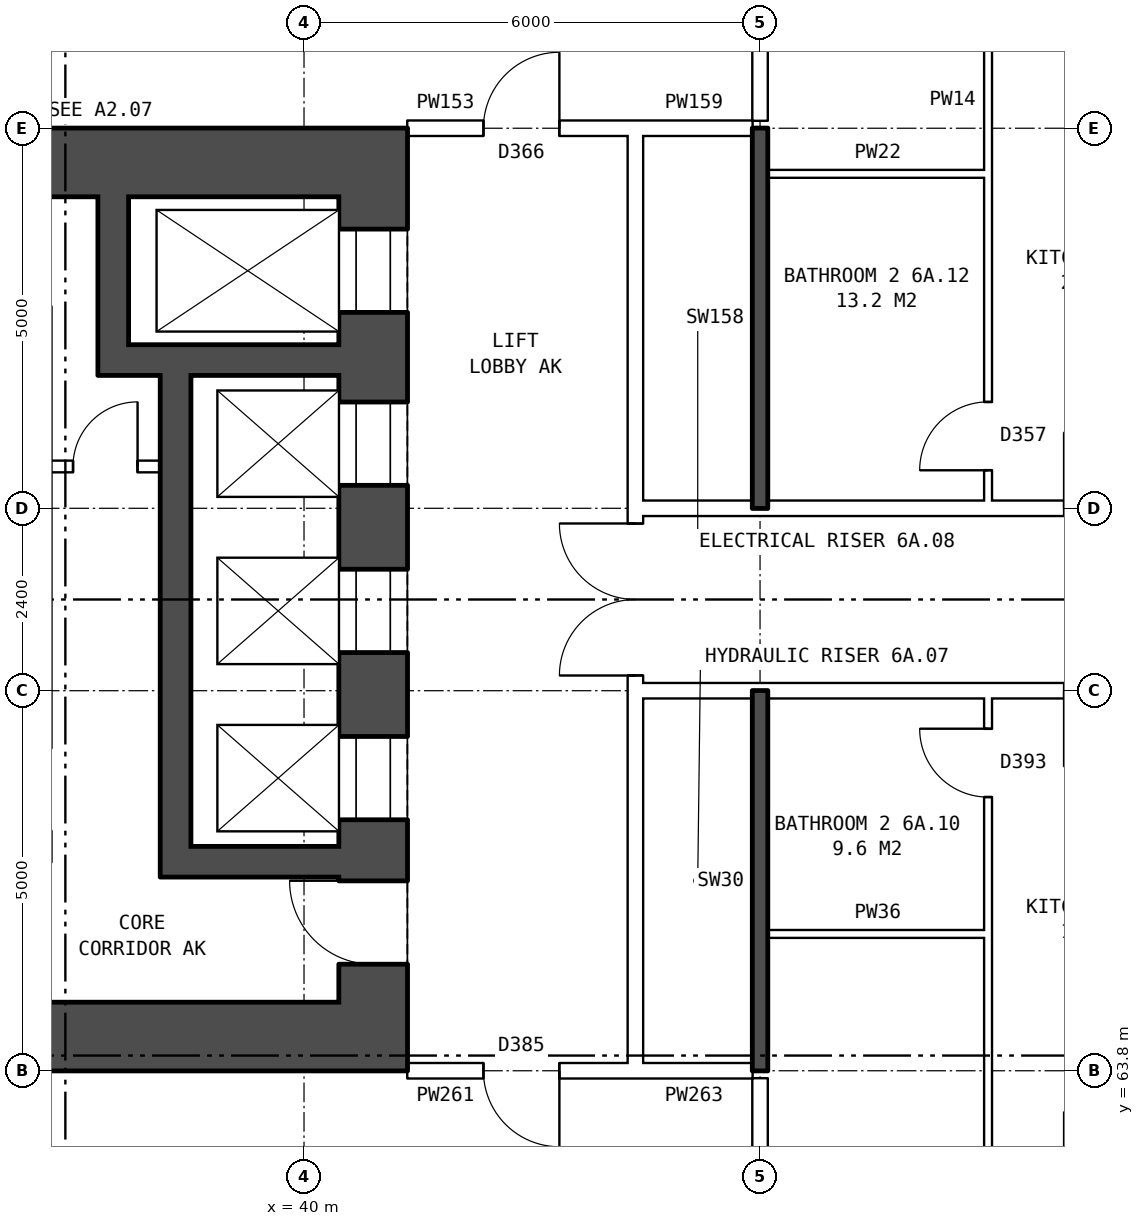
"""IFC4 building model, lengths in metres.
Left out: names, types, materials, properties, quantities, classifications, styles, units other than length and angle.
Written with IfcOpenShell. Run it as: python <this file> out.ifc"""

import sys

from ifc_helpers import new_model, si_unit, direction, frame, frame_2d, origin, place, context, subcontext, project, spatial, rectangle, extrude, element, fill, save


model = new_model("IFC4")
c1 = context("Model", 3, precision=1e-05, world=origin(), true_north=direction((0.0, 1.0)))
c2 = subcontext(c1, "Body", "Model", "MODEL_VIEW")
j1 = project(units=[si_unit("LENGTHUNIT", "METRE"), si_unit("PLANEANGLEUNIT", "RADIAN")], contexts=[c1])
p1 = place(None, origin())
s1 = spatial("IfcSite", under=j1, at=p1, CompositionType="ELEMENT")
p2 = place(p1, origin())
s2 = spatial("IfcBuilding", under=s1, at=p2, CompositionType="ELEMENT")
p3 = place(p2, frame((0.0, 0.0, 25.7)))
s3 = spatial("IfcBuildingStorey", under=s2, at=p3, CompositionType="ELEMENT", Elevation=25.7)
p4 = place(p3, frame((40.91, 75.3, 0.0), z_axis=(0.0, 0.0, 1.0), x_axis=(0.0, -1.0, 0.0)))
e1 = element("IfcWall", 1, at=p4, inside=s3, PredefinedType="SHEAR", context=c2, shape_type="SweptSolid", body=[
    extrude(rectangle(XDim=10.6, YDim=0.9, at=frame_2d((5.3, 0.0))), origin(), (0.0, 0.0, 1.0), 2.85),
])
p5 = place(p4, frame((0.425, 0.0, 0.0)))
e2 = element("IfcOpeningElement", 2, at=p5, cuts=e1, PredefinedType="OPENING", context=c2, shape_type="SweptSolid", body=[
    extrude(rectangle(XDim=1.1, YDim=2.1, at=frame_2d((0.55, 1.05))), frame((0.0, 0.46, 0.0), z_axis=(0.0, -1.0, 0.0), x_axis=(1.0, 0.0, 0.0)), (0.0, 0.0, 1.0), 0.92),
])
p6 = place(p4, frame((2.7, 0.0, 0.0)))
e3 = element("IfcOpeningElement", 3, at=p6, cuts=e1, PredefinedType="OPENING", context=c2, shape_type="SweptSolid", body=[
    extrude(rectangle(XDim=1.1, YDim=2.1, at=frame_2d((0.55, 1.05))), frame((0.0, 0.46, 0.0), z_axis=(0.0, -1.0, 0.0), x_axis=(1.0, 0.0, 0.0)), (0.0, 0.0, 1.0), 0.92),
])
p7 = place(p4, frame((4.9, 0.0, 0.0)))
e4 = element("IfcOpeningElement", 4, at=p7, cuts=e1, PredefinedType="OPENING", context=c2, shape_type="SweptSolid", body=[
    extrude(rectangle(XDim=1.1, YDim=2.1, at=frame_2d((0.55, 1.05))), frame((0.0, 0.46, 0.0), z_axis=(0.0, -1.0, 0.0), x_axis=(1.0, 0.0, 0.0)), (0.0, 0.0, 1.0), 0.92),
])
p8 = place(p4, frame((7.1, 0.0, 0.0)))
e5 = element("IfcOpeningElement", 5, at=p8, cuts=e1, PredefinedType="OPENING", context=c2, shape_type="SweptSolid", body=[
    extrude(rectangle(XDim=1.1, YDim=2.1, at=frame_2d((0.55, 1.05))), frame((0.0, 0.46, 0.0), z_axis=(0.0, -1.0, 0.0), x_axis=(1.0, 0.0, 0.0)), (0.0, 0.0, 1.0), 0.92),
])
p9 = place(p4, frame((9.0, 0.0, 0.0)))
e6 = element("IfcOpeningElement", 6, at=p9, cuts=e1, PredefinedType="OPENING", context=c2, shape_type="SweptSolid", body=[
    extrude(rectangle(XDim=1.1, YDim=2.1, at=frame_2d((0.55, 1.05))), frame((0.0, 0.46, 0.0), z_axis=(0.0, -1.0, 0.0), x_axis=(1.0, 0.0, 0.0)), (0.0, 0.0, 1.0), 0.92),
])
for number, where, z_axis, x_axis in (
    (7, (41.36, 75.75, 0.0), (0.0, 0.0, 1.0), (-1.0, 0.0, 0.0)),
    (8, (41.36, 64.25, 0.0), (0.0, 0.0, 1.0), (-1.0, 0.0, 0.0)),
):
    element("IfcWall", number, at=place(p3, frame(where, z_axis=z_axis, x_axis=x_axis)), inside=s3, PredefinedType="SHEAR", context=c2, shape_type="SweptSolid", body=[
        extrude(rectangle(XDim=9.0, YDim=0.9, at=frame_2d((4.5, 0.0))), origin(), (0.0, 0.0, 1.0), 2.85),
    ])
p10 = place(p3, frame((40.46, 73.15, 0.0), z_axis=(0.0, 0.0, 1.0), x_axis=(-1.0, 0.0, 0.0)))
e9 = element("IfcWall", 9, at=p10, inside=s3, PredefinedType="SHEAR", context=c2, shape_type="SweptSolid", body=[
    extrude(rectangle(XDim=3.17, YDim=0.4, at=frame_2d((1.585, 0.0))), origin(), (0.0, 0.0, 1.0), 2.85),
])
p11 = place(p3, frame((38.11, 71.75, 0.0), z_axis=(0.0, 0.0, 1.0), x_axis=(-1.0, 0.0, 0.0)))
e10 = element("IfcWall", 10, at=p11, inside=s3, PredefinedType="PARTITIONING", context=c2, shape_type="SweptSolid", body=[
    extrude(rectangle(XDim=1.45, YDim=0.15, at=frame_2d((0.725, 0.0))), origin(), (0.0, 0.0, 1.0), 2.85),
])
p12 = place(p11, frame((0.3, 0.0, 0.0)))
e11 = element("IfcOpeningElement", 11, at=p12, cuts=e10, PredefinedType="OPENING", context=c2, shape_type="SweptSolid", body=[
    extrude(rectangle(XDim=0.85, YDim=2.1, at=frame_2d((0.425, 1.05))), frame((0.0, 0.085, 0.0), z_axis=(0.0, -1.0, 0.0), x_axis=(1.0, 0.0, 0.0)), (0.0, 0.0, 1.0), 0.17),
])
p13 = place(p3, frame((40.46, 66.55, 0.0), z_axis=(0.0, 0.0, 1.0), x_axis=(-1.0, 0.0, 0.0)))
e12 = element("IfcWall", 12, at=p13, inside=s3, PredefinedType="SHEAR", context=c2, shape_type="SweptSolid", body=[
    extrude(rectangle(XDim=1.95, YDim=0.4, at=frame_2d((0.975, 0.0))), origin(), (0.0, 0.0, 1.0), 2.85),
])
p14 = place(p3, frame((38.31, 72.95, 0.0), z_axis=(0.0, 0.0, 1.0), x_axis=(0.0, -1.0, 0.0)))
e13 = element("IfcWall", 13, at=p14, inside=s3, PredefinedType="SHEAR", context=c2, shape_type="SweptSolid", body=[
    extrude(rectangle(XDim=6.6, YDim=0.4, at=frame_2d((3.3, 0.0))), origin(), (0.0, 0.0, 1.0), 2.85),
])
p15 = place(p3, frame((37.49, 75.3, 0.0), z_axis=(0.0, 0.0, 1.0), x_axis=(0.0, -1.0, 0.0)))
e14 = element("IfcWall", 14, at=p15, inside=s3, PredefinedType="SHEAR", context=c2, shape_type="SweptSolid", body=[
    extrude(rectangle(XDim=1.95, YDim=0.4, at=frame_2d((0.975, 0.0))), origin(), (0.0, 0.0, 1.0), 2.85),
])
p16 = place(p3, frame((44.36, 63.9, 0.0), z_axis=(0.0, 0.0, 1.0), x_axis=(0.0, 1.0, 0.0)))
e15 = element("IfcWall", 15, at=p16, inside=s3, PredefinedType="PARTITIONING", context=c2, shape_type="SweptSolid", body=[
    extrude(rectangle(XDim=12.2, YDim=0.2, at=frame_2d((6.1, 0.0))), origin(), (0.0, 0.0, 1.0), 2.85),
])
p17 = place(p16, frame((5.1, 0.0, 0.0)))
e16 = element("IfcOpeningElement", 16, at=p17, cuts=e15, PredefinedType="OPENING", context=c2, shape_type="SweptSolid", body=[
    extrude(rectangle(XDim=2.0, YDim=2.1, at=frame_2d((1.0, 1.05))), frame((0.0, 0.11, 0.0), z_axis=(0.0, -1.0, 0.0), x_axis=(1.0, 0.0, 0.0)), (0.0, 0.0, 1.0), 0.22),
])
p18 = place(p3, frame((41.36, 63.8, 0.0), z_axis=(0.0, 0.0, 1.0), x_axis=(1.0, 0.0, 0.0)))
e17 = element("IfcWall", 17, at=p18, inside=s3, PredefinedType="PARTITIONING", context=c2, shape_type="SweptSolid", body=[
    extrude(rectangle(XDim=3.0, YDim=0.2, at=frame_2d((1.5, 0.0))), origin(), (0.0, 0.0, 1.0), 2.85),
])
p19 = place(p18, frame((1.0, 0.0, 0.0)))
e18 = element("IfcOpeningElement", 18, at=p19, cuts=e17, PredefinedType="OPENING", context=c2, shape_type="SweptSolid", body=[
    extrude(rectangle(XDim=1.0, YDim=2.1, at=frame_2d((0.5, 1.05))), frame((0.0, 0.11, 0.0), z_axis=(0.0, -1.0, 0.0), x_axis=(1.0, 0.0, 0.0)), (0.0, 0.0, 1.0), 0.22),
])
p20 = place(p3, frame((44.36, 63.8, 0.0), z_axis=(0.0, 0.0, 1.0), x_axis=(1.0, 0.0, 0.0)))
e19 = element("IfcWall", 19, at=p20, inside=s3, PredefinedType="PARTITIONING", context=c2, shape_type="SweptSolid", body=[
    extrude(rectangle(XDim=1.54, YDim=0.2, at=frame_2d((0.77, 0.0))), origin(), (0.0, 0.0, 1.0), 2.85),
])
p21 = place(p3, frame((46.1, 65.6, 0.0), z_axis=(0.0, 0.0, 1.0), x_axis=(1.0, 0.0, 0.0)))
e20 = element("IfcWall", 20, at=p21, inside=s3, PredefinedType="PARTITIONING", context=c2, shape_type="SweptSolid", body=[
    extrude(rectangle(XDim=2.9, YDim=0.1, at=frame_2d((1.45, 0.0))), origin(), (0.0, 0.0, 1.0), 2.85),
])
p22 = place(p3, frame((44.36, 68.8, 0.0), z_axis=(0.0, 0.0, 1.0), x_axis=(1.0, 0.0, 0.0)))
e21 = element("IfcWall", 21, at=p22, inside=s3, PredefinedType="PARTITIONING", context=c2, shape_type="SweptSolid", body=[
    extrude(rectangle(XDim=19.28, YDim=0.2, at=frame_2d((9.64, 0.0))), origin(), (0.0, 0.0, 1.0), 2.85),
])
p23 = place(p22, frame((14.64, 0.0, 0.0)))
e22 = element("IfcOpeningElement", 22, at=p23, cuts=e21, PredefinedType="OPENING", context=c2, shape_type="SweptSolid", body=[
    extrude(rectangle(XDim=1.0, YDim=2.1, at=frame_2d((0.5, 1.05))), frame((0.0, 0.11, 0.0), z_axis=(0.0, -1.0, 0.0), x_axis=(1.0, 0.0, 0.0)), (0.0, 0.0, 1.0), 0.22),
])
p24 = place(p22, frame((5.64, 0.0, 0.0)))
e23 = element("IfcOpeningElement", 23, at=p24, cuts=e21, PredefinedType="OPENING", context=c2, shape_type="SweptSolid", body=[
    extrude(rectangle(XDim=1.0, YDim=2.1, at=frame_2d((0.5, 1.05))), frame((0.0, 0.11, 0.0), z_axis=(0.0, -1.0, 0.0), x_axis=(1.0, 0.0, 0.0)), (0.0, 0.0, 1.0), 0.22),
])
p25 = place(p3, frame((44.36, 71.2, 0.0), z_axis=(0.0, 0.0, 1.0), x_axis=(1.0, 0.0, 0.0)))
e24 = element("IfcWall", 24, at=p25, inside=s3, PredefinedType="PARTITIONING", context=c2, shape_type="SweptSolid", body=[
    extrude(rectangle(XDim=19.28, YDim=0.2, at=frame_2d((9.64, 0.0))), origin(), (0.0, 0.0, 1.0), 2.85),
])
p26 = place(p25, frame((14.64, 0.0, 0.0)))
e25 = element("IfcOpeningElement", 25, at=p26, cuts=e24, PredefinedType="OPENING", context=c2, shape_type="SweptSolid", body=[
    extrude(rectangle(XDim=1.0, YDim=2.1, at=frame_2d((0.5, 1.05))), frame((0.0, 0.11, 0.0), z_axis=(0.0, -1.0, 0.0), x_axis=(1.0, 0.0, 0.0)), (0.0, 0.0, 1.0), 0.22),
])
p27 = place(p25, frame((5.64, 0.0, 0.0)))
e26 = element("IfcOpeningElement", 26, at=p27, cuts=e24, PredefinedType="OPENING", context=c2, shape_type="SweptSolid", body=[
    extrude(rectangle(XDim=1.0, YDim=2.1, at=frame_2d((0.5, 1.05))), frame((0.0, 0.11, 0.0), z_axis=(0.0, -1.0, 0.0), x_axis=(1.0, 0.0, 0.0)), (0.0, 0.0, 1.0), 0.22),
])
p28 = place(p3, frame((46.1, 75.6, 0.0), z_axis=(0.0, 0.0, 1.0), x_axis=(1.0, 0.0, 0.0)))
e27 = element("IfcWall", 27, at=p28, inside=s3, PredefinedType="PARTITIONING", context=c2, shape_type="SweptSolid", body=[
    extrude(rectangle(XDim=2.9, YDim=0.1, at=frame_2d((1.45, 0.0))), origin(), (0.0, 0.0, 1.0), 2.85),
])
p29 = place(p3, frame((41.36, 76.2, 0.0), z_axis=(0.0, 0.0, 1.0), x_axis=(1.0, 0.0, 0.0)))
e28 = element("IfcWall", 28, at=p29, inside=s3, PredefinedType="PARTITIONING", context=c2, shape_type="SweptSolid", body=[
    extrude(rectangle(XDim=3.0, YDim=0.2, at=frame_2d((1.5, 0.0))), origin(), (0.0, 0.0, 1.0), 2.85),
])
p30 = place(p29, frame((1.0, 0.0, 0.0)))
e29 = element("IfcOpeningElement", 29, at=p30, cuts=e28, PredefinedType="OPENING", context=c2, shape_type="SweptSolid", body=[
    extrude(rectangle(XDim=1.0, YDim=2.1, at=frame_2d((0.5, 1.05))), frame((0.0, 0.11, 0.0), z_axis=(0.0, -1.0, 0.0), x_axis=(1.0, 0.0, 0.0)), (0.0, 0.0, 1.0), 0.22),
])
p31 = place(p3, frame((44.36, 76.2, 0.0), z_axis=(0.0, 0.0, 1.0), x_axis=(1.0, 0.0, 0.0)))
e30 = element("IfcWall", 30, at=p31, inside=s3, PredefinedType="PARTITIONING", context=c2, shape_type="SweptSolid", body=[
    extrude(rectangle(XDim=1.54, YDim=0.2, at=frame_2d((0.77, 0.0))), origin(), (0.0, 0.0, 1.0), 2.85),
])
p32 = place(p3, frame((46.0, 61.5, 0.0), z_axis=(0.0, 0.0, 1.0), x_axis=(0.0, 1.0, 0.0)))
e31 = element("IfcWall", 31, at=p32, inside=s3, PredefinedType="PARTITIONING", context=c2, shape_type="SweptSolid", body=[
    extrude(rectangle(XDim=2.2, YDim=0.2, at=frame_2d((1.1, 0.0))), origin(), (0.0, 0.0, 1.0), 2.85),
])
for number, where, z_axis, x_axis in (
    (32, (46.0, 63.8, 0.0), (0.0, 0.0, 1.0), (0.0, 1.0, 0.0)),
    (33, (46.0, 71.2, 0.0), (0.0, 0.0, 1.0), (0.0, 1.0, 0.0)),
):
    element("IfcWall", number, at=place(p3, frame(where, z_axis=z_axis, x_axis=x_axis)), inside=s3, PredefinedType="SOLIDWALL", context=c2, shape_type="SweptSolid", body=[
        extrude(rectangle(XDim=5.0, YDim=0.2, at=frame_2d((2.5, 0.0))), origin(), (0.0, 0.0, 1.0), 2.85),
    ])
p33 = place(p3, frame((46.0, 76.3, 0.0), z_axis=(0.0, 0.0, 1.0), x_axis=(0.0, 1.0, 0.0)))
e34 = element("IfcWall", 34, at=p33, inside=s3, PredefinedType="PARTITIONING", context=c2, shape_type="SweptSolid", body=[
    extrude(rectangle(XDim=2.2, YDim=0.2, at=frame_2d((1.1, 0.0))), origin(), (0.0, 0.0, 1.0), 2.85),
])
p34 = place(p3, frame((49.0, 54.36, 0.0), z_axis=(0.0, 0.0, 1.0), x_axis=(0.0, 1.0, 0.0)))
e35 = element("IfcWall", 35, at=p34, inside=s3, PredefinedType="PARTITIONING", context=c2, shape_type="SweptSolid", body=[
    extrude(rectangle(XDim=14.34, YDim=0.1, at=frame_2d((7.17, 0.0))), origin(), (0.0, 0.0, 1.0), 2.85),
])
p35 = place(p34, frame((6.7, 0.0, 0.0)))
e36 = element("IfcOpeningElement", 36, at=p35, cuts=e35, PredefinedType="OPENING", context=c2, shape_type="SweptSolid", body=[
    extrude(rectangle(XDim=0.9, YDim=2.1, at=frame_2d((0.45, 1.05))), frame((0.0, 0.06, 0.0), z_axis=(0.0, -1.0, 0.0), x_axis=(1.0, 0.0, 0.0)), (0.0, 0.0, 1.0), 0.12),
])
p36 = place(p34, frame((13.04, 0.0, 0.0)))
e37 = element("IfcOpeningElement", 37, at=p36, cuts=e35, PredefinedType="OPENING", context=c2, shape_type="SweptSolid", body=[
    extrude(rectangle(XDim=0.9, YDim=2.1, at=frame_2d((0.45, 1.05))), frame((0.0, 0.06, 0.0), z_axis=(0.0, -1.0, 0.0), x_axis=(1.0, 0.0, 0.0)), (0.0, 0.0, 1.0), 0.12),
])
p37 = place(p3, frame((49.0, 71.3, 0.0), z_axis=(0.0, 0.0, 1.0), x_axis=(0.0, 1.0, 0.0)))
e38 = element("IfcWall", 38, at=p37, inside=s3, PredefinedType="PARTITIONING", context=c2, shape_type="SweptSolid", body=[
    extrude(rectangle(XDim=14.34, YDim=0.1, at=frame_2d((7.17, 0.0))), origin(), (0.0, 0.0, 1.0), 2.85),
])
p38 = place(p37, frame((9.24, 0.0, 0.0)))
e39 = element("IfcOpeningElement", 39, at=p38, cuts=e38, PredefinedType="OPENING", context=c2, shape_type="SweptSolid", body=[
    extrude(rectangle(XDim=0.9, YDim=2.1, at=frame_2d((0.45, 1.05))), frame((0.0, 0.06, 0.0), z_axis=(0.0, -1.0, 0.0), x_axis=(1.0, 0.0, 0.0)), (0.0, 0.0, 1.0), 0.12),
])
p39 = place(p37, frame((0.4, 0.0, 0.0)))
e40 = element("IfcOpeningElement", 40, at=p39, cuts=e38, PredefinedType="OPENING", context=c2, shape_type="SweptSolid", body=[
    extrude(rectangle(XDim=0.9, YDim=2.1, at=frame_2d((0.45, 1.05))), frame((0.0, 0.06, 0.0), z_axis=(0.0, -1.0, 0.0), x_axis=(1.0, 0.0, 0.0)), (0.0, 0.0, 1.0), 0.12),
])
p40 = place(p5, origin())
e41 = element("IfcDoor", 41, at=p40, inside=s3, OperationType="DOUBLE_DOOR_SLIDING", PredefinedType="DOOR", context=c2, shape_type="SweptSolid", body=[
    extrude(rectangle(XDim=1.1, YDim=2.1, at=frame_2d((0.55, 1.05))), frame((0.0, -0.385, 0.0), z_axis=(0.0, -1.0, 0.0), x_axis=(1.0, 0.0, 0.0)), (0.0, 0.0, 1.0), 0.05),
])
fill(e2, e41)
p41 = place(p6, origin())
e42 = element("IfcDoor", 42, at=p41, inside=s3, OperationType="DOUBLE_DOOR_SLIDING", PredefinedType="DOOR", context=c2, shape_type="SweptSolid", body=[
    extrude(rectangle(XDim=1.1, YDim=2.1, at=frame_2d((0.55, 1.05))), frame((0.0, -0.385, 0.0), z_axis=(0.0, -1.0, 0.0), x_axis=(1.0, 0.0, 0.0)), (0.0, 0.0, 1.0), 0.05),
])
fill(e3, e42)
p42 = place(p7, origin())
e43 = element("IfcDoor", 43, at=p42, inside=s3, OperationType="DOUBLE_DOOR_SLIDING", PredefinedType="DOOR", context=c2, shape_type="SweptSolid", body=[
    extrude(rectangle(XDim=1.1, YDim=2.1, at=frame_2d((0.55, 1.05))), frame((0.0, -0.385, 0.0), z_axis=(0.0, -1.0, 0.0), x_axis=(1.0, 0.0, 0.0)), (0.0, 0.0, 1.0), 0.05),
])
fill(e4, e43)
p43 = place(p8, origin())
e44 = element("IfcDoor", 44, at=p43, inside=s3, OperationType="DOUBLE_DOOR_SLIDING", PredefinedType="DOOR", context=c2, shape_type="SweptSolid", body=[
    extrude(rectangle(XDim=1.1, YDim=2.1, at=frame_2d((0.55, 1.05))), frame((0.0, -0.385, 0.0), z_axis=(0.0, -1.0, 0.0), x_axis=(1.0, 0.0, 0.0)), (0.0, 0.0, 1.0), 0.05),
])
fill(e5, e44)
p44 = place(p9, frame((1.1, 0.0, 0.0), z_axis=(0.0, 0.0, 1.0), x_axis=(-1.0, 0.0, 0.0)))
e45 = element("IfcDoor", 45, at=p44, inside=s3, OperationType="SINGLE_SWING_RIGHT", PredefinedType="DOOR", context=c2, shape_type="SweptSolid", body=[
    extrude(rectangle(XDim=1.1, YDim=2.1, at=frame_2d((0.55, 1.05))), frame((0.0, 0.435, 0.0), z_axis=(0.0, -1.0, 0.0), x_axis=(1.0, 0.0, 0.0)), (0.0, 0.0, 1.0), 0.05),
])
fill(e6, e45)
p45 = place(p12, frame((0.85, 0.0, 0.0), z_axis=(0.0, 0.0, 1.0), x_axis=(-1.0, 0.0, 0.0)))
e46 = element("IfcDoor", 46, at=p45, inside=s3, OperationType="SINGLE_SWING_RIGHT", PredefinedType="DOOR", context=c2, shape_type="SweptSolid", body=[
    extrude(rectangle(XDim=0.85, YDim=2.1, at=frame_2d((0.425, 1.05))), frame((0.0, 0.025, 0.0), z_axis=(0.0, -1.0, 0.0), x_axis=(1.0, 0.0, 0.0)), (0.0, 0.0, 1.0), 0.05),
])
fill(e11, e46)
p46 = place(p17, origin())
e47 = element("IfcDoor", 47, at=p46, inside=s3, OperationType="DOUBLE_DOOR_SINGLE_SWING", PredefinedType="DOOR", context=c2, shape_type="SweptSolid", body=[
    extrude(rectangle(XDim=2.0, YDim=2.1, at=frame_2d((1.0, 1.05))), frame((0.0, 0.025, 0.0), z_axis=(0.0, -1.0, 0.0), x_axis=(1.0, 0.0, 0.0)), (0.0, 0.0, 1.0), 0.05),
])
fill(e16, e47)
p47 = place(p19, frame((1.0, 0.0, 0.0), z_axis=(0.0, 0.0, 1.0), x_axis=(-1.0, 0.0, 0.0)))
e48 = element("IfcDoor", 48, at=p47, inside=s3, OperationType="SINGLE_SWING_LEFT", PredefinedType="DOOR", context=c2, shape_type="SweptSolid", body=[
    extrude(rectangle(XDim=1.0, YDim=2.1, at=frame_2d((0.5, 1.05))), frame((0.0, 0.025, 0.0), z_axis=(0.0, -1.0, 0.0), x_axis=(1.0, 0.0, 0.0)), (0.0, 0.0, 1.0), 0.05),
])
fill(e18, e48)
p48 = place(p30, origin())
e49 = element("IfcDoor", 49, at=p48, inside=s3, OperationType="SINGLE_SWING_RIGHT", PredefinedType="DOOR", context=c2, shape_type="SweptSolid", body=[
    extrude(rectangle(XDim=1.0, YDim=2.1, at=frame_2d((0.5, 1.05))), frame((0.0, 0.025, 0.0), z_axis=(0.0, -1.0, 0.0), x_axis=(1.0, 0.0, 0.0)), (0.0, 0.0, 1.0), 0.05),
])
fill(e29, e49)
p49 = place(p36, origin())
e50 = element("IfcDoor", 50, at=p49, inside=s3, OperationType="SINGLE_SWING_RIGHT", PredefinedType="DOOR", context=c2, shape_type="SweptSolid", body=[
    extrude(rectangle(XDim=0.9, YDim=2.1, at=frame_2d((0.45, 1.05))), frame((0.0, 0.025, 0.0), z_axis=(0.0, -1.0, 0.0), x_axis=(1.0, 0.0, 0.0)), (0.0, 0.0, 1.0), 0.05),
])
fill(e37, e50)
p50 = place(p39, origin())
e51 = element("IfcDoor", 51, at=p50, inside=s3, OperationType="SINGLE_SWING_LEFT", PredefinedType="DOOR", context=c2, shape_type="SweptSolid", body=[
    extrude(rectangle(XDim=0.9, YDim=2.1, at=frame_2d((0.45, 1.05))), frame((0.0, 0.025, 0.0), z_axis=(0.0, -1.0, 0.0), x_axis=(1.0, 0.0, 0.0)), (0.0, 0.0, 1.0), 0.05),
])
fill(e40, e51)
save(model, sys.argv[1])
